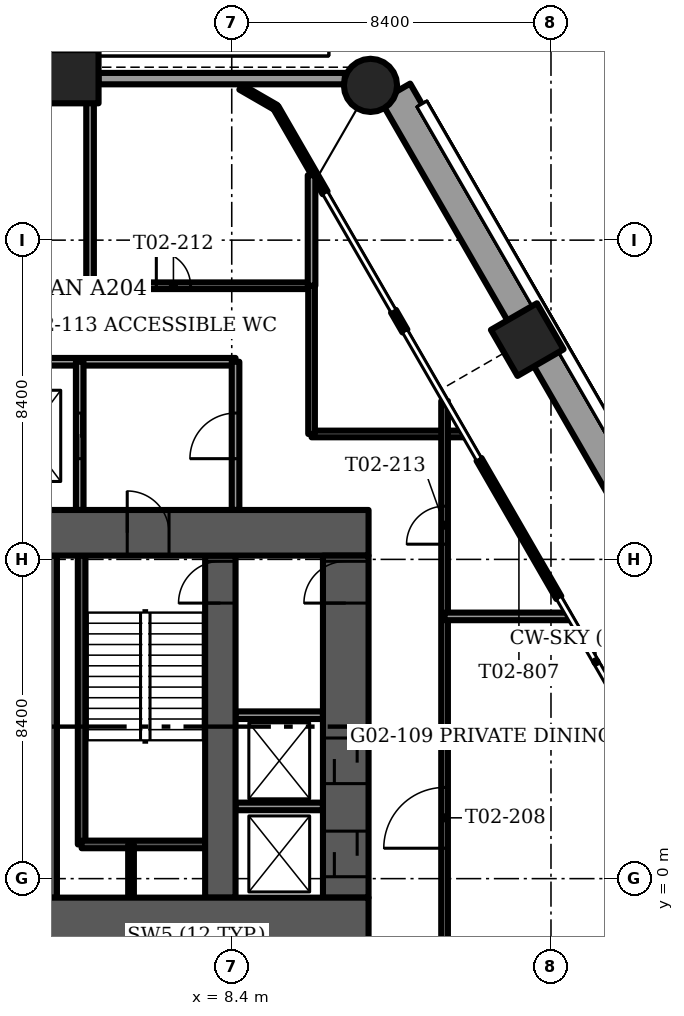
"""IFC4 building model, lengths in metres.
Left out: names, types, materials, properties, quantities, classifications, styles, units other than length and angle.
Written with IfcOpenShell. Run it as: python <this file> out.ifc"""

import sys

from ifc_helpers import new_model, si_unit, direction, frame, frame_2d, origin, origin_2d, place, context, subcontext, project, spatial, rectangle, circle, extrude, element, fill, save


model = new_model("IFC4")
c1 = context("Model", 3, precision=1e-05, world=origin(), true_north=direction((0.0, 1.0)))
c2 = subcontext(c1, "Body", "Model", "MODEL_VIEW")
j1 = project(units=[si_unit("LENGTHUNIT", "METRE"), si_unit("PLANEANGLEUNIT", "RADIAN")], contexts=[c1])
p1 = place(None, origin())
s1 = spatial("IfcSite", under=j1, at=p1, CompositionType="ELEMENT")
p2 = place(p1, origin())
s2 = spatial("IfcBuilding", under=s1, at=p2, CompositionType="ELEMENT")
p3 = place(p2, frame((0.0, 0.0, 10.0)))
s3 = spatial("IfcBuildingStorey", under=s2, at=p3, CompositionType="ELEMENT", Elevation=10.0)
p4 = place(p3, frame((12.051, 20.872, -1.2), z_axis=(0.0, 0.0, 1.0), x_axis=(1.0, 0.0, 0.0)))
e1 = element("IfcColumn", 1, at=p4, inside=s3, PredefinedType="COLUMN", context=c2, shape_type="SweptSolid", body=[
    extrude(circle(Radius=0.7, at=origin_2d()), origin(), (0.0, 0.0, 1.0), 4.5),
])
for number, where, z_axis, x_axis in (
    (2, (4.195, 21.1, -1.2), (0.0, 0.0, 1.0), (1.0, 0.0, 0.0)),
    (3, (16.175, 14.183, -1.2), (0.0, 0.0, 1.0), (0.5, -0.866, 0.0)),
):
    element("IfcColumn", number, at=place(p3, frame(where, z_axis=z_axis, x_axis=x_axis)), inside=s3, PredefinedType="COLUMN", context=c2, shape_type="SweptSolid", body=[
        extrude(rectangle(XDim=1.4, YDim=1.4, at=origin_2d()), origin(), (0.0, 0.0, 1.0), 4.5),
    ])
p5 = place(p3, frame((-12.0, -1.1, -0.3), z_axis=(0.0, 0.0, 1.0), x_axis=(1.0, 0.0, 0.0)))
e4 = element("IfcWall", 4, at=p5, inside=s3, PredefinedType="SHEAR", context=c2, shape_type="SweptSolid", body=[
    extrude(rectangle(XDim=24.0, YDim=1.2, at=frame_2d((12.0, 0.0))), origin(), (0.0, 0.0, 1.0), 4.5),
])
p6 = place(p5, frame((11.2, 0.0, 0.0)))
e5 = element("IfcOpeningElement", 5, at=p6, cuts=e4, PredefinedType="OPENING", context=c2, shape_type="SweptSolid", body=[
    extrude(rectangle(XDim=1.6, YDim=2.1, at=frame_2d((0.8, 1.05))), frame((0.0, 0.6, 0.0), z_axis=(0.0, -1.0, 0.0), x_axis=(1.0, 0.0, 0.0)), (0.0, 0.0, 1.0), 1.2),
])
p7 = place(p3, frame((-12.0, 9.1, -0.3), z_axis=(0.0, 0.0, 1.0), x_axis=(1.0, 0.0, 0.0)))
e6 = element("IfcWall", 6, at=p7, inside=s3, PredefinedType="SHEAR", context=c2, shape_type="SweptSolid", body=[
    extrude(rectangle(XDim=24.0, YDim=1.2, at=frame_2d((12.0, 0.0))), origin(), (0.0, 0.0, 1.0), 4.5),
])
p8 = place(p7, frame((11.2, 0.0, 0.0)))
e7 = element("IfcOpeningElement", 7, at=p8, cuts=e6, PredefinedType="OPENING", context=c2, shape_type="SweptSolid", body=[
    extrude(rectangle(XDim=1.6, YDim=2.1, at=frame_2d((0.8, 1.05))), frame((0.0, 0.6, 0.0), z_axis=(0.0, -1.0, 0.0), x_axis=(1.0, 0.0, 0.0)), (0.0, 0.0, 1.0), 1.2),
])
p9 = place(p7, frame((5.25, 0.0, 0.0)))
e8 = element("IfcOpeningElement", 8, at=p9, cuts=e6, PredefinedType="OPENING", context=c2, shape_type="SweptSolid", body=[
    extrude(rectangle(XDim=1.1, YDim=2.1, at=frame_2d((0.55, 1.05))), frame((0.0, 0.6, 0.0), z_axis=(0.0, -1.0, 0.0), x_axis=(1.0, 0.0, 0.0)), (0.0, 0.0, 1.0), 1.2),
])
p10 = place(p7, frame((17.65, 0.0, 0.0)))
e9 = element("IfcOpeningElement", 9, at=p10, cuts=e6, PredefinedType="OPENING", context=c2, shape_type="SweptSolid", body=[
    extrude(rectangle(XDim=1.1, YDim=2.1, at=frame_2d((0.55, 1.05))), frame((0.0, 0.6, 0.0), z_axis=(0.0, -1.0, 0.0), x_axis=(1.0, 0.0, 0.0)), (0.0, 0.0, 1.0), 1.2),
])
p11 = place(p3, frame((8.1, -0.5, -0.3), z_axis=(0.0, 0.0, 1.0), x_axis=(0.0, 1.0, 0.0)))
e10 = element("IfcWall", 10, at=p11, inside=s3, PredefinedType="SHEAR", context=c2, shape_type="SweptSolid", body=[
    extrude(rectangle(XDim=9.0, YDim=0.8, at=frame_2d((4.5, 0.0))), origin(), (0.0, 0.0, 1.0), 4.5),
])
p12 = place(p11, frame((7.75, 0.0, 0.0)))
e11 = element("IfcOpeningElement", 11, at=p12, cuts=e10, PredefinedType="OPENING", context=c2, shape_type="SweptSolid", body=[
    extrude(rectangle(XDim=1.1, YDim=2.1, at=frame_2d((0.55, 1.05))), frame((0.0, 0.4, 0.0), z_axis=(0.0, -1.0, 0.0), x_axis=(1.0, 0.0, 0.0)), (0.0, 0.0, 1.0), 0.8),
])
p13 = place(p3, frame((3.6, -0.5, -0.3), z_axis=(0.0, 0.0, 1.0), x_axis=(0.0, 1.0, 0.0)))
e12 = element("IfcWall", 12, at=p13, inside=s3, PredefinedType="SHEAR", context=c2, shape_type="SweptSolid", body=[
    extrude(rectangle(XDim=9.0, YDim=0.4, at=frame_2d((4.5, 0.0))), origin(), (0.0, 0.0, 1.0), 4.5),
])
p14 = place(p3, frame((11.4, -0.5, -0.3), z_axis=(0.0, 0.0, 1.0), x_axis=(0.0, 1.0, 0.0)))
e13 = element("IfcWall", 13, at=p14, inside=s3, PredefinedType="SHEAR", context=c2, shape_type="SweptSolid", body=[
    extrude(rectangle(XDim=9.0, YDim=1.2, at=frame_2d((4.5, 0.0))), origin(), (0.0, 0.0, 1.0), 4.5),
])
p15 = place(p14, frame((7.75, 0.0, 0.0)))
e14 = element("IfcOpeningElement", 14, at=p15, cuts=e13, PredefinedType="OPENING", context=c2, shape_type="SweptSolid", body=[
    extrude(rectangle(XDim=1.1, YDim=2.1, at=frame_2d((0.55, 1.05))), frame((0.0, 0.6, 0.0), z_axis=(0.0, -1.0, 0.0), x_axis=(1.0, 0.0, 0.0)), (0.0, 0.0, 1.0), 1.2),
])
p16 = place(p14, frame((0.55, 0.0, 0.0)))
e15 = element("IfcOpeningElement", 15, at=p16, cuts=e13, PredefinedType="OPENING", context=c2, shape_type="SweptSolid", body=[
    extrude(rectangle(XDim=1.2, YDim=2.1, at=frame_2d((0.6, 1.05))), frame((0.0, 0.6, 0.0), z_axis=(0.0, -1.0, 0.0), x_axis=(1.0, 0.0, 0.0)), (0.0, 0.0, 1.0), 1.2),
])
p17 = place(p14, frame((3.0, 0.0, 0.0)))
e16 = element("IfcOpeningElement", 16, at=p17, cuts=e13, PredefinedType="OPENING", context=c2, shape_type="SweptSolid", body=[
    extrude(rectangle(XDim=1.2, YDim=2.1, at=frame_2d((0.6, 1.05))), frame((0.0, 0.6, 0.0), z_axis=(0.0, -1.0, 0.0), x_axis=(1.0, 0.0, 0.0)), (0.0, 0.0, 1.0), 1.2),
])
p18 = place(p3, frame((20.252, 7.622, 0.0), z_axis=(0.0, 0.0, 1.0), x_axis=(-0.499997206141, 0.866027016814, 0.0)))
e17 = element("IfcWall", 17, at=p18, inside=s3, PredefinedType="PARAPET", context=c2, shape_type="SweptSolid", body=[
    extrude(rectangle(XDim=7.051, YDim=0.9, at=frame_2d((3.525, 0.0))), origin(), (0.0, 0.0, 1.0), 1.1),
])
p19 = place(p3, frame((16.057, 14.889, 0.0), z_axis=(0.0, 0.0, 1.0), x_axis=(-0.500005133765, 0.866022439784, 0.0)))
e18 = element("IfcWall", 18, at=p19, inside=s3, PredefinedType="PARAPET", context=c2, shape_type="SweptSolid", body=[
    extrude(rectangle(XDim=6.704, YDim=0.9, at=frame_2d((3.352, 0.0))), origin(), (0.0, 0.0, 1.0), 1.1),
])
p20 = place(p3, frame((11.377, 21.05, 0.0), z_axis=(0.0, 0.0, 1.0), x_axis=(-1.0, 0.0, 0.0)))
e19 = element("IfcWall", 19, at=p20, inside=s3, PredefinedType="SOLIDWALL", context=c2, shape_type="SweptSolid", body=[
    extrude(rectangle(XDim=6.481, YDim=0.3, at=frame_2d((3.241, 0.0))), origin(), (0.0, 0.0, 1.0), 3.3),
])
p21 = place(p3, frame((17.007, 7.394, 0.0), z_axis=(0.0, 0.0, 1.0), x_axis=(-0.500002543286, 0.866023935413, 0.0)))
e20 = element("IfcWall", 20, at=p21, inside=s3, PredefinedType="SOLIDWALL", context=c2, shape_type="SweptSolid", body=[
    extrude(rectangle(XDim=4.2, YDim=0.15, at=frame_2d((2.1, 0.0))), origin(), (0.0, 0.0, 1.0), 4.2),
])
p22 = place(p21, frame((0.6, 0.0, 0.0)))
e21 = element("IfcOpeningElement", 21, at=p22, cuts=e20, PredefinedType="OPENING", context=c2, shape_type="SweptSolid", body=[
    extrude(rectangle(XDim=3.0, YDim=2.4, at=frame_2d((1.5, 1.2))), frame((0.0, 0.075, 0.0), z_axis=(0.0, -1.0, 0.0), x_axis=(1.0, 0.0, 0.0)), (0.0, 0.0, 1.0), 0.15),
])
p23 = place(p3, frame((10.856, 18.046, 0.0), z_axis=(0.0, 0.0, 1.0), x_axis=(-0.499945140294, 0.866057074734, 0.0)))
e22 = element("IfcWall", 22, at=p23, inside=s3, PredefinedType="SOLIDWALL", context=c2, shape_type="SweptSolid", body=[
    extrude(rectangle(XDim=2.594, YDim=0.15, at=frame_2d((1.297, 0.0))), origin(), (0.0, 0.0, 1.0), 4.2),
])
p24 = place(p3, frame((12.957, 14.409, 0.0), z_axis=(0.0, 0.0, 1.0), x_axis=(-0.50012165622, 0.865955154139, 0.0)))
e23 = element("IfcWall", 23, at=p24, inside=s3, PredefinedType="SOLIDWALL", context=c2, shape_type="SweptSolid", body=[
    extrude(rectangle(XDim=0.6, YDim=0.15, at=frame_2d((0.3, 0.0))), origin(), (0.0, 0.0, 1.0), 4.2),
])
p25 = place(p3, frame((9.56, 20.292, 0.0), z_axis=(0.0, 0.0, 1.0), x_axis=(-0.866048165231, 0.499960573946, 0.0)))
e24 = element("IfcWall", 24, at=p25, inside=s3, PredefinedType="SOLIDWALL", context=c2, shape_type="SweptSolid", body=[
    extrude(rectangle(XDim=1.065, YDim=0.15, at=frame_2d((0.532, 0.0))), origin(), (0.0, 0.0, 1.0), 4.2),
])
p26 = place(p25, frame((0.258, 0.0, 0.15)))
e25 = element("IfcOpeningElement", 25, at=p26, cuts=e24, PredefinedType="OPENING", context=c2, shape_type="SweptSolid", body=[
    extrude(rectangle(XDim=0.55, YDim=3.6, at=frame_2d((0.275, 1.8))), frame((0.0, 0.075, 0.0), z_axis=(0.0, -1.0, 0.0), x_axis=(1.0, 0.0, 0.0)), (0.0, 0.0, 1.0), 0.15),
])
p27 = place(p3, frame((4.45, 0.9, -0.3), z_axis=(0.0, 0.0, 1.0), x_axis=(0.0, 1.0, 0.0)))
e26 = element("IfcWall", 26, at=p27, inside=s3, PredefinedType="SOLIDWALL", context=c2, shape_type="SweptSolid", body=[
    extrude(rectangle(XDim=7.6, YDim=0.2, at=frame_2d((3.8, 0.0))), origin(), (0.0, 0.0, 1.0), 4.5),
])
p28 = place(p3, frame((4.45, 0.9, -0.3), z_axis=(0.0, 0.0, 1.0), x_axis=(1.0, 0.0, 0.0)))
e27 = element("IfcWall", 27, at=p28, inside=s3, PredefinedType="SOLIDWALL", context=c2, shape_type="SweptSolid", body=[
    extrude(rectangle(XDim=3.25, YDim=0.2, at=frame_2d((1.625, 0.0))), origin(), (0.0, 0.0, 1.0), 4.5),
])
p29 = place(p3, frame((5.75, -0.5, 0.0), z_axis=(0.0, 0.0, 1.0), x_axis=(0.0, 1.0, 0.0)))
e28 = element("IfcWall", 28, at=p29, inside=s3, PredefinedType="PARTITIONING", context=c2, shape_type="SweptSolid", body=[
    extrude(rectangle(XDim=1.4, YDim=0.15, at=frame_2d((0.7, 0.0))), origin(), (0.0, 0.0, 1.0), 4.2),
])
p30 = place(p3, frame((-8.5, 13.6, 0.0), z_axis=(0.0, 0.0, 1.0), x_axis=(1.0, 0.0, 0.0)))
e29 = element("IfcWall", 29, at=p30, inside=s3, PredefinedType="PARTITIONING", context=c2, shape_type="SweptSolid", body=[
    extrude(rectangle(XDim=17.0, YDim=0.2, at=frame_2d((8.5, 0.0))), origin(), (0.0, 0.0, 1.0), 4.2),
])
p31 = place(p3, frame((8.5, 9.7, 0.0), z_axis=(0.0, 0.0, 1.0), x_axis=(0.0, 1.0, 0.0)))
e30 = element("IfcWall", 30, at=p31, inside=s3, PredefinedType="PARTITIONING", context=c2, shape_type="SweptSolid", body=[
    extrude(rectangle(XDim=3.9, YDim=0.2, at=frame_2d((1.95, 0.0))), origin(), (0.0, 0.0, 1.0), 4.2),
])
p32 = place(p31, frame((1.35, 0.0, 0.0)))
e31 = element("IfcOpeningElement", 31, at=p32, cuts=e30, PredefinedType="OPENING", context=c2, shape_type="SweptSolid", body=[
    extrude(rectangle(XDim=1.2, YDim=2.1, at=frame_2d((0.6, 1.05))), frame((0.0, 0.1, 0.0), z_axis=(0.0, -1.0, 0.0), x_axis=(1.0, 0.0, 0.0)), (0.0, 0.0, 1.0), 0.2),
])
p33 = place(p3, frame((4.4, 9.7, 0.0), z_axis=(0.0, 0.0, 1.0), x_axis=(0.0, 1.0, 0.0)))
e32 = element("IfcWall", 32, at=p33, inside=s3, PredefinedType="PARTITIONING", context=c2, shape_type="SweptSolid", body=[
    extrude(rectangle(XDim=3.9, YDim=0.2, at=frame_2d((1.95, 0.0))), origin(), (0.0, 0.0, 1.0), 4.2),
])
p34 = place(p33, frame((1.35, 0.0, 0.0)))
e33 = element("IfcOpeningElement", 33, at=p34, cuts=e32, PredefinedType="OPENING", context=c2, shape_type="SweptSolid", body=[
    extrude(rectangle(XDim=1.2, YDim=2.1, at=frame_2d((0.6, 1.05))), frame((0.0, 0.1, 0.0), z_axis=(0.0, -1.0, 0.0), x_axis=(1.0, 0.0, 0.0)), (0.0, 0.0, 1.0), 0.2),
])
for number, where, z_axis, x_axis in (
    (34, (8.5, 1.9, 0.0), (0.0, 0.0, 1.0), (1.0, 0.0, 0.0)),
    (35, (8.5, 4.3, 0.0), (0.0, 0.0, 1.0), (1.0, 0.0, 0.0)),
):
    element("IfcWall", number, at=place(p3, frame(where, z_axis=z_axis, x_axis=x_axis)), inside=s3, PredefinedType="PARTITIONING", context=c2, shape_type="SweptSolid", body=[
        extrude(rectangle(XDim=2.3, YDim=0.2, at=frame_2d((1.15, 0.0))), origin(), (0.0, 0.0, 1.0), 4.2),
    ])
p35 = place(p3, frame((10.5, 11.7, 0.0), z_axis=(0.0, 0.0, 1.0), x_axis=(1.0, 0.0, 0.0)))
e36 = element("IfcWall", 36, at=p35, inside=s3, PredefinedType="PARTITIONING", context=c2, shape_type="SweptSolid", body=[
    extrude(rectangle(XDim=3.999, YDim=0.175, at=frame_2d((2.0, 0.0))), origin(), (0.0, 0.0, 1.0), 4.2),
])
p36 = place(p3, frame((0.4, 15.6, 0.0), z_axis=(0.0, 0.0, 1.0), x_axis=(1.0, 0.0, 0.0)))
e37 = element("IfcWall", 37, at=p36, inside=s3, PredefinedType="PARTITIONING", context=c2, shape_type="SweptSolid", body=[
    extrude(rectangle(XDim=10.1, YDim=0.175, at=frame_2d((5.05, 0.0))), origin(), (0.0, 0.0, 1.0), 4.2),
])
p37 = place(p36, frame((6.016, 0.0, 0.0)))
e38 = element("IfcOpeningElement", 38, at=p37, cuts=e37, PredefinedType="OPENING", context=c2, shape_type="SweptSolid", body=[
    extrude(rectangle(XDim=0.9, YDim=2.1, at=frame_2d((0.45, 1.05))), frame((0.0, 0.087, 0.0), z_axis=(0.0, -1.0, 0.0), x_axis=(1.0, 0.0, 0.0)), (0.0, 0.0, 1.0), 0.175),
])
p38 = place(p3, frame((10.5, 11.7, 0.0), z_axis=(0.0, 0.0, 1.0), x_axis=(0.0, 1.0, 0.0)))
e39 = element("IfcWall", 39, at=p38, inside=s3, PredefinedType="PARTITIONING", context=c2, shape_type="SweptSolid", body=[
    extrude(rectangle(XDim=3.9, YDim=0.175, at=frame_2d((1.95, 0.0))), origin(), (0.0, 0.0, 1.0), 4.2),
])
p39 = place(p3, frame((14.0, -3.7, 0.0), z_axis=(0.0, 0.0, 1.0), x_axis=(0.0, 1.0, 0.0)))
e40 = element("IfcWall", 40, at=p39, inside=s3, PredefinedType="PARTITIONING", context=c2, shape_type="SweptSolid", body=[
    extrude(rectangle(XDim=16.268, YDim=0.175, at=frame_2d((8.134, 0.0))), origin(), (0.0, 0.0, 1.0), 4.2),
])
p40 = place(p39, frame((4.5, 0.0, 0.0)))
e41 = element("IfcOpeningElement", 41, at=p40, cuts=e40, PredefinedType="OPENING", context=c2, shape_type="SweptSolid", body=[
    extrude(rectangle(XDim=1.6, YDim=2.1, at=frame_2d((0.8, 1.05))), frame((0.0, 0.087, 0.0), z_axis=(0.0, -1.0, 0.0), x_axis=(1.0, 0.0, 0.0)), (0.0, 0.0, 1.0), 0.175),
])
p41 = place(p39, frame((12.5, 0.0, 0.0)))
e42 = element("IfcOpeningElement", 42, at=p41, cuts=e40, PredefinedType="OPENING", context=c2, shape_type="SweptSolid", body=[
    extrude(rectangle(XDim=1.0, YDim=2.1, at=frame_2d((0.5, 1.05))), frame((0.0, 0.087, 0.0), z_axis=(0.0, -1.0, 0.0), x_axis=(1.0, 0.0, 0.0)), (0.0, 0.0, 1.0), 0.175),
])
p42 = place(p3, frame((14.0, 6.9, 0.0), z_axis=(0.0, 0.0, 1.0), x_axis=(1.0, 0.0, 0.0)))
e43 = element("IfcWall", 43, at=p42, inside=s3, PredefinedType="PARTITIONING", context=c2, shape_type="SweptSolid", body=[
    extrude(rectangle(XDim=3.271, YDim=0.2, at=frame_2d((1.635, 0.0))), origin(), (0.0, 0.0, 1.0), 4.2),
])
p43 = place(p3, frame((4.672, 15.6, 0.0), z_axis=(0.0, 0.0, 1.0), x_axis=(0.0, 1.0, 0.0)))
e44 = element("IfcWall", 44, at=p43, inside=s3, PredefinedType="PARTITIONING", context=c2, shape_type="SweptSolid", body=[
    extrude(rectangle(XDim=5.07, YDim=0.2, at=frame_2d((2.535, 0.0))), origin(), (0.0, 0.0, 1.0), 4.2),
])
p44 = place(p3, frame((10.5, 15.6, 0.0), z_axis=(0.0, 0.0, 1.0), x_axis=(0.0, 1.0, 0.0)))
e45 = element("IfcWall", 45, at=p44, inside=s3, PredefinedType="PARTITIONING", context=c2, shape_type="SweptSolid", body=[
    extrude(rectangle(XDim=2.908, YDim=0.2, at=frame_2d((1.454, 0.0))), origin(), (0.0, 0.0, 1.0), 4.2),
])
p45 = place(p22, origin())
e46 = element("IfcDoor", 46, at=p45, inside=s3, OperationType="SLIDING_TO_LEFT", PredefinedType="DOOR", context=c2, shape_type="SweptSolid", body=[
    extrude(rectangle(XDim=3.0, YDim=2.4, at=frame_2d((1.5, 1.2))), frame((0.0, 0.025, 0.0), z_axis=(0.0, -1.0, 0.0), x_axis=(1.0, 0.0, 0.0)), (0.0, 0.0, 1.0), 0.05),
])
fill(e21, e46)
p46 = place(p26, origin())
e47 = element("IfcWindow", 47, at=p46, inside=s3, PartitioningType="SINGLE_PANEL", PredefinedType="WINDOW", context=c2, shape_type="SweptSolid", body=[
    extrude(rectangle(XDim=0.55, YDim=3.6, at=frame_2d((0.275, 1.8))), frame((0.0, 0.03, 0.0), z_axis=(0.0, -1.0, 0.0), x_axis=(1.0, 0.0, 0.0)), (0.0, 0.0, 1.0), 0.06),
])
fill(e25, e47)
p47 = place(p10, origin())
e48 = element("IfcDoor", 48, at=p47, inside=s3, OperationType="SINGLE_SWING_RIGHT", PredefinedType="DOOR", context=c2, shape_type="SweptSolid", body=[
    extrude(rectangle(XDim=1.1, YDim=2.1, at=frame_2d((0.55, 1.05))), frame((0.0, 0.025, 0.0), z_axis=(0.0, -1.0, 0.0), x_axis=(1.0, 0.0, 0.0)), (0.0, 0.0, 1.0), 0.05),
])
fill(e9, e48)
p48 = place(p12, origin())
e49 = element("IfcDoor", 49, at=p48, inside=s3, OperationType="SINGLE_SWING_LEFT", PredefinedType="DOOR", context=c2, shape_type="SweptSolid", body=[
    extrude(rectangle(XDim=1.1, YDim=2.1, at=frame_2d((0.55, 1.05))), frame((0.0, 0.025, 0.0), z_axis=(0.0, -1.0, 0.0), x_axis=(1.0, 0.0, 0.0)), (0.0, 0.0, 1.0), 0.05),
])
fill(e11, e49)
p49 = place(p34, origin())
e50 = element("IfcDoor", 50, at=p49, inside=s3, OperationType="SLIDING_TO_LEFT", PredefinedType="DOOR", context=c2, shape_type="SweptSolid", body=[
    extrude(rectangle(XDim=1.2, YDim=2.1, at=frame_2d((0.6, 1.05))), frame((0.0, 0.025, 0.0), z_axis=(0.0, -1.0, 0.0), x_axis=(1.0, 0.0, 0.0)), (0.0, 0.0, 1.0), 0.05),
])
fill(e33, e50)
p50 = place(p32, origin())
e51 = element("IfcDoor", 51, at=p50, inside=s3, OperationType="SINGLE_SWING_LEFT", PredefinedType="DOOR", context=c2, shape_type="SweptSolid", body=[
    extrude(rectangle(XDim=1.2, YDim=2.1, at=frame_2d((0.6, 1.05))), frame((0.0, 0.025, 0.0), z_axis=(0.0, -1.0, 0.0), x_axis=(1.0, 0.0, 0.0)), (0.0, 0.0, 1.0), 0.05),
])
fill(e31, e51)
p51 = place(p15, origin())
e52 = element("IfcDoor", 52, at=p51, inside=s3, OperationType="SINGLE_SWING_RIGHT", PredefinedType="DOOR", context=c2, shape_type="SweptSolid", body=[
    extrude(rectangle(XDim=1.1, YDim=2.1, at=frame_2d((0.55, 1.05))), frame((0.0, 0.025, 0.0), z_axis=(0.0, -1.0, 0.0), x_axis=(1.0, 0.0, 0.0)), (0.0, 0.0, 1.0), 0.05),
])
fill(e14, e52)
p52 = place(p16, origin())
e53 = element("IfcDoor", 53, at=p52, inside=s3, OperationType="SLIDING_TO_LEFT", PredefinedType="DOOR", context=c2, shape_type="SweptSolid", body=[
    extrude(rectangle(XDim=1.2, YDim=2.1, at=frame_2d((0.6, 1.05))), frame((0.0, 0.025, 0.0), z_axis=(0.0, -1.0, 0.0), x_axis=(1.0, 0.0, 0.0)), (0.0, 0.0, 1.0), 0.05),
])
fill(e15, e53)
p53 = place(p17, origin())
e54 = element("IfcDoor", 54, at=p53, inside=s3, OperationType="SLIDING_TO_LEFT", PredefinedType="DOOR", context=c2, shape_type="SweptSolid", body=[
    extrude(rectangle(XDim=1.2, YDim=2.1, at=frame_2d((0.6, 1.05))), frame((0.0, 0.025, 0.0), z_axis=(0.0, -1.0, 0.0), x_axis=(1.0, 0.0, 0.0)), (0.0, 0.0, 1.0), 0.05),
])
fill(e16, e54)
p54 = place(p40, origin())
e55 = element("IfcDoor", 55, at=p54, inside=s3, OperationType="DOUBLE_DOOR_SINGLE_SWING", PredefinedType="DOOR", context=c2, shape_type="SweptSolid", body=[
    extrude(rectangle(XDim=1.6, YDim=2.1, at=frame_2d((0.8, 1.05))), frame((0.0, 0.025, 0.0), z_axis=(0.0, -1.0, 0.0), x_axis=(1.0, 0.0, 0.0)), (0.0, 0.0, 1.0), 0.05),
])
fill(e41, e55)
p55 = place(p37, origin())
e56 = element("IfcDoor", 56, at=p55, inside=s3, OperationType="SINGLE_SWING_RIGHT", PredefinedType="DOOR", context=c2, shape_type="SweptSolid", body=[
    extrude(rectangle(XDim=0.9, YDim=2.1, at=frame_2d((0.45, 1.05))), frame((0.0, 0.025, 0.0), z_axis=(0.0, -1.0, 0.0), x_axis=(1.0, 0.0, 0.0)), (0.0, 0.0, 1.0), 0.05),
])
fill(e38, e56)
p56 = place(p41, origin())
e57 = element("IfcDoor", 57, at=p56, inside=s3, OperationType="SINGLE_SWING_LEFT", PredefinedType="DOOR", context=c2, shape_type="SweptSolid", body=[
    extrude(rectangle(XDim=1.0, YDim=2.1, at=frame_2d((0.5, 1.05))), frame((0.0, 0.025, 0.0), z_axis=(0.0, -1.0, 0.0), x_axis=(1.0, 0.0, 0.0)), (0.0, 0.0, 1.0), 0.05),
])
fill(e42, e57)
save(model, sys.argv[1])
